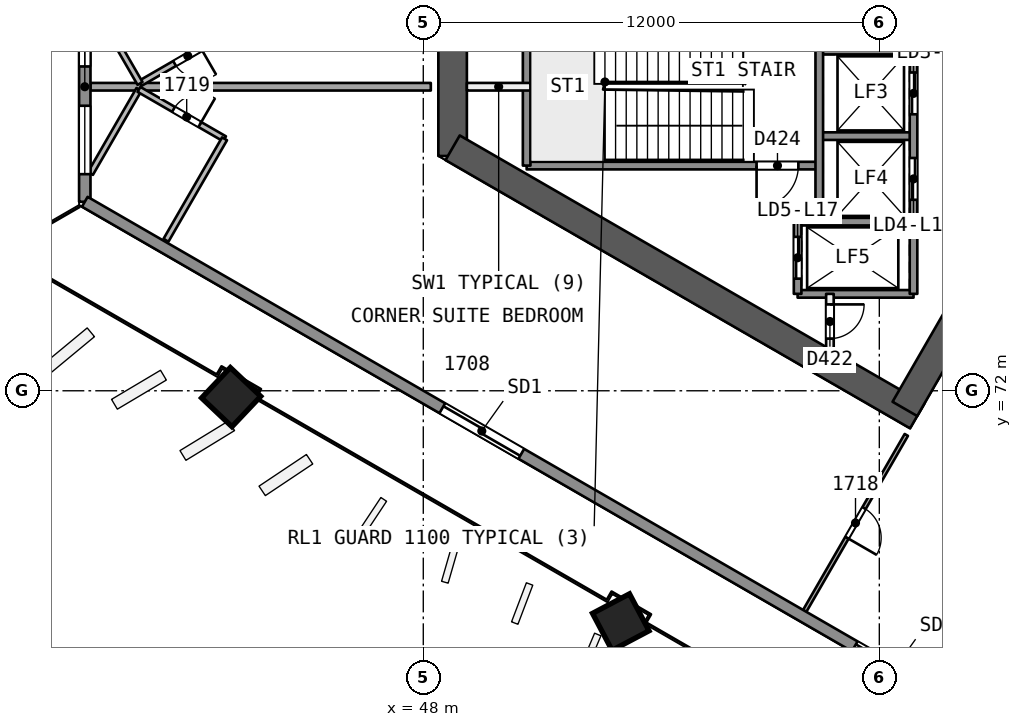
"""IFC4 building model, lengths in metres.
Left out: names, types, materials, properties, quantities, classifications, styles, units other than length and angle.
Written with IfcOpenShell. Run it as: python <this file> out.ifc"""

import sys

from ifc_helpers import new_model, si_unit, direction, frame, frame_2d, origin, origin_2d, place, context, subcontext, project, spatial, rectangle, extrude, element, fill, save


model = new_model("IFC4")
c1 = context("Model", 3, precision=1e-05, world=origin(), true_north=direction((0.0, 1.0)))
c2 = subcontext(c1, "Body", "Model", "MODEL_VIEW")
j1 = project(units=[si_unit("LENGTHUNIT", "METRE"), si_unit("PLANEANGLEUNIT", "RADIAN")], contexts=[c1])
p1 = place(None, origin())
s1 = spatial("IfcSite", under=j1, at=p1, CompositionType="ELEMENT")
p2 = place(p1, origin())
s2 = spatial("IfcBuilding", under=s1, at=p2, CompositionType="ELEMENT")
p3 = place(p2, frame((0.0, 0.0, 75.8)))
s3 = spatial("IfcBuildingStorey", under=s2, at=p3, CompositionType="ELEMENT", Elevation=75.8)
p4 = place(p3, frame((65.567, 80.0, 0.0), z_axis=(0.0, 0.0, 1.0), x_axis=(-0.499988615364, 0.866031976607, 0.0)))
e1 = element("IfcWall", 1, at=p4, inside=s3, PredefinedType="SHEAR", context=c2, shape_type="SweptSolid", body=[
    extrude(rectangle(XDim=10.163, YDim=0.75, at=frame_2d((5.082, 0.0))), origin(), (0.0, 0.0, 1.0), 3.7),
])
p5 = place(p4, frame((0.733, 0.0, 0.0)))
e2 = element("IfcOpeningElement", 2, at=p5, cuts=e1, PredefinedType="OPENING", context=c2, shape_type="SweptSolid", body=[
    extrude(rectangle(XDim=1.2, YDim=2.1, at=frame_2d((0.6, 1.05))), frame((0.0, 0.385, 0.0), z_axis=(0.0, -1.0, 0.0), x_axis=(1.0, 0.0, 0.0)), (0.0, 0.0, 1.0), 0.771),
])
p6 = place(p3, frame((48.772, 81.606, 0.0), z_axis=(0.0, 0.0, 1.0), x_axis=(0.0, -1.0, 0.0)))
e3 = element("IfcWall", 3, at=p6, inside=s3, PredefinedType="SHEAR", context=c2, shape_type="SweptSolid", body=[
    extrude(rectangle(XDim=3.429, YDim=0.75, at=frame_2d((1.714, 0.0))), origin(), (0.0, 0.0, 1.0), 3.7),
])
p7 = place(p3, frame((48.772, 78.394, 0.0), z_axis=(0.0, 0.0, 1.0), x_axis=(0.866028339916, -0.499994914436, 0.0)))
e4 = element("IfcWall", 4, at=p7, inside=s3, PredefinedType="SHEAR", context=c2, shape_type="SweptSolid", body=[
    extrude(rectangle(XDim=14.117, YDim=0.75, at=frame_2d((7.059, 0.0))), origin(), (0.0, 0.0, 1.0), 3.7),
])
p8 = place(p3, frame((60.673, 71.523, 0.0), z_axis=(0.0, 0.0, 1.0), x_axis=(0.499997052475, 0.866027105532, 0.0)))
e5 = element("IfcWall", 5, at=p8, inside=s3, PredefinedType="SHEAR", context=c2, shape_type="SweptSolid", body=[
    extrude(rectangle(XDim=10.005, YDim=0.75, at=frame_2d((5.002, 0.0))), origin(), (0.0, 0.0, 1.0), 3.7),
])
p9 = place(p8, frame((7.855, 0.0, 0.0)))
e6 = element("IfcOpeningElement", 6, at=p9, cuts=e5, PredefinedType="OPENING", context=c2, shape_type="SweptSolid", body=[
    extrude(rectangle(XDim=1.2, YDim=2.1, at=frame_2d((0.6, 1.05))), frame((0.0, 0.385, 0.0), z_axis=(0.0, -1.0, 0.0), x_axis=(1.0, 0.0, 0.0)), (0.0, 0.0, 1.0), 0.771),
])
p10 = place(p3, frame((42.91, 71.824, 0.0), z_axis=(0.02855911485, 0.006793507689, 0.999569019734), x_axis=(-0.865319840559, 0.500766443848, 0.021319996519)))
e7 = element("IfcColumn", 7, at=p10, inside=s3, PredefinedType="COLUMN", context=c2, shape_type="SweptSolid", body=[
    extrude(rectangle(XDim=1.1, YDim=1.1, at=origin_2d()), origin(), (0.0, 0.0, 1.0), 3.702),
])
p11 = place(p3, frame((53.174, 65.899, 0.0), z_axis=(0.019328516974, 0.012138044789, 0.999739504221), x_axis=(-0.865694061334, 0.500459928951, 0.010660754407)))
e8 = element("IfcColumn", 8, at=p11, inside=s3, PredefinedType="COLUMN", context=c2, shape_type="SweptSolid", body=[
    extrude(rectangle(XDim=1.1, YDim=1.1, at=origin_2d()), origin(), (0.0, 0.0, 1.0), 3.701),
])
p12 = place(p3, frame((42.798, 81.386, 0.0), z_axis=(0.0, 0.0, 1.0), x_axis=(-0.866021400173, -0.500006934395, 0.0)))
e9 = element("IfcWall", 9, at=p12, inside=s3, PredefinedType="PARTITIONING", context=c2, shape_type="SweptSolid", body=[
    extrude(rectangle(XDim=2.6, YDim=0.15, at=frame_2d((1.3, 0.0))), origin(), (0.0, 0.0, 1.0), 3.2),
])
p13 = place(p12, frame((0.75, 0.0, 0.0)))
e10 = element("IfcOpeningElement", 10, at=p13, cuts=e9, PredefinedType="OPENING", context=c2, shape_type="SweptSolid", body=[
    extrude(rectangle(XDim=0.8, YDim=2.1, at=frame_2d((0.4, 1.05))), frame((0.0, 0.085, 0.0), z_axis=(0.0, -1.0, 0.0), x_axis=(1.0, 0.0, 0.0)), (0.0, 0.0, 1.0), 0.171),
])
p14 = place(p3, frame((40.547, 80.086, 0.0), z_axis=(0.0, 0.0, 1.0), x_axis=(-0.500022016631, 0.866012692104, 0.0)))
e11 = element("IfcWall", 11, at=p14, inside=s3, PredefinedType="PARTITIONING", context=c2, shape_type="SweptSolid", body=[
    extrude(rectangle(XDim=2.61, YDim=0.15, at=frame_2d((1.305, 0.0))), origin(), (0.0, 0.0, 1.0), 3.2),
])
p15 = place(p3, frame((39.241, 80.0, 0.0), z_axis=(0.0, 0.0, 1.0), x_axis=(1.0, 0.0, 0.0)))
e12 = element("IfcWall", 12, at=p15, inside=s3, PredefinedType="PARTITIONING", context=c2, shape_type="SweptSolid", body=[
    extrude(rectangle(XDim=8.957, YDim=0.2, at=frame_2d((4.478, 0.0))), origin(), (0.0, 0.0, 1.0), 3.2),
])
p16 = place(p3, frame((60.71, 70.838, 0.0), z_axis=(0.0, 0.0, 1.0), x_axis=(-0.499974070055, -0.866040373927, 0.0)))
e13 = element("IfcWall", 13, at=p16, inside=s3, PredefinedType="PARTITIONING", context=c2, shape_type="SweptSolid", body=[
    extrude(rectangle(XDim=5.347, YDim=0.1, at=frame_2d((2.674, 0.0))), origin(), (0.0, 0.0, 1.0), 3.2),
])
p17 = place(p16, frame((2.224, 0.0, 0.0)))
e14 = element("IfcOpeningElement", 14, at=p17, cuts=e13, PredefinedType="OPENING", context=c2, shape_type="SweptSolid", body=[
    extrude(rectangle(XDim=0.9, YDim=2.1, at=frame_2d((0.45, 1.05))), frame((0.0, 0.061, 0.0), z_axis=(0.0, -1.0, 0.0), x_axis=(1.0, 0.0, 0.0)), (0.0, 0.0, 1.0), 0.121),
])
p18 = place(p3, frame((39.241, 77.718, 0.0), z_axis=(0.0, 0.0, 1.0), x_axis=(0.500014808323, 0.866016854026, 0.0)))
e15 = element("IfcWall", 15, at=p18, inside=s3, PredefinedType="PARTITIONING", context=c2, shape_type="SweptSolid", body=[
    extrude(rectangle(XDim=2.554, YDim=0.15, at=frame_2d((1.277, 0.0))), origin(), (0.0, 0.0, 1.0), 3.2),
])
p19 = place(p3, frame((40.519, 79.93, 0.0), z_axis=(0.0, 0.0, 1.0), x_axis=(0.866062058628, -0.499936506574, 0.0)))
e16 = element("IfcWall", 16, at=p19, inside=s3, PredefinedType="PARTITIONING", context=c2, shape_type="SweptSolid", body=[
    extrude(rectangle(XDim=2.6, YDim=0.15, at=frame_2d((1.3, 0.0))), origin(), (0.0, 0.0, 1.0), 3.2),
])
p20 = place(p19, frame((1.05, 0.0, 0.0)))
e17 = element("IfcOpeningElement", 17, at=p20, cuts=e16, PredefinedType="OPENING", context=c2, shape_type="SweptSolid", body=[
    extrude(rectangle(XDim=0.8, YDim=2.1, at=frame_2d((0.4, 1.05))), frame((0.0, 0.085, 0.0), z_axis=(0.0, -1.0, 0.0), x_axis=(1.0, 0.0, 0.0)), (0.0, 0.0, 1.0), 0.171),
])
p21 = place(p3, frame((42.77, 78.63, 0.0), z_axis=(0.0, 0.0, 1.0), x_axis=(-0.500021696003, -0.866012877229, 0.0)))
e18 = element("IfcWall", 18, at=p21, inside=s3, PredefinedType="PARTITIONING", context=c2, shape_type="SweptSolid", body=[
    extrude(rectangle(XDim=3.084, YDim=0.15, at=frame_2d((1.542, 0.0))), origin(), (0.0, 0.0, 1.0), 3.2),
])
p22 = place(p3, frame((39.093, 76.973, 0.0), z_axis=(0.0, 0.0, 1.0), x_axis=(0.0, 1.0, 0.0)))
e19 = element("IfcWall", 19, at=p22, inside=s3, PredefinedType="SOLIDWALL", context=c2, shape_type="SweptSolid", body=[
    extrude(rectangle(XDim=6.054, YDim=0.3, at=frame_2d((3.027, 0.0))), origin(), (0.0, 0.0, 1.0), 3.2),
])
p23 = place(p22, frame((3.56, 0.0, 0.9)))
e20 = element("IfcOpeningElement", 20, at=p23, cuts=e19, PredefinedType="OPENING", context=c2, shape_type="SweptSolid", body=[
    extrude(rectangle(XDim=1.8, YDim=1.5, at=frame_2d((0.9, 0.75))), frame((0.0, 0.161, 0.0), z_axis=(0.0, -1.0, 0.0), x_axis=(1.0, 0.0, 0.0)), (0.0, 0.0, 1.0), 0.321),
])
p24 = place(p22, frame((0.727, 0.0, 0.9)))
e21 = element("IfcOpeningElement", 21, at=p24, cuts=e19, PredefinedType="OPENING", context=c2, shape_type="SweptSolid", body=[
    extrude(rectangle(XDim=1.8, YDim=1.5, at=frame_2d((0.9, 0.75))), frame((0.0, 0.161, 0.0), z_axis=(0.0, -1.0, 0.0), x_axis=(1.0, 0.0, 0.0)), (0.0, 0.0, 1.0), 0.321),
])
p25 = place(p3, frame((90.332, 47.39, 0.0), z_axis=(0.0, 0.0, 1.0), x_axis=(-0.866024586246, 0.500001416016, 0.0)))
e22 = element("IfcWall", 22, at=p25, inside=s3, PredefinedType="SOLIDWALL", context=c2, shape_type="SweptSolid", body=[
    extrude(rectangle(XDim=59.166, YDim=0.3, at=frame_2d((29.583, 0.0))), origin(), (0.0, 0.0, 1.0), 3.2),
])
p26 = place(p25, frame((28.695, 0.0, 0.0)))
e23 = element("IfcOpeningElement", 23, at=p26, cuts=e22, PredefinedType="OPENING", context=c2, shape_type="SweptSolid", body=[
    extrude(rectangle(XDim=2.4, YDim=2.4, at=frame_2d((1.2, 1.2))), frame((0.0, 0.161, 0.0), z_axis=(0.0, -1.0, 0.0), x_axis=(1.0, 0.0, 0.0)), (0.0, 0.0, 1.0), 0.321),
])
p27 = place(p25, frame((33.372, 0.0, 0.0)))
e24 = element("IfcOpeningElement", 24, at=p27, cuts=e22, PredefinedType="OPENING", context=c2, shape_type="SweptSolid", body=[
    extrude(rectangle(XDim=2.4, YDim=2.4, at=frame_2d((1.2, 1.2))), frame((0.0, 0.161, 0.0), z_axis=(0.0, -1.0, 0.0), x_axis=(1.0, 0.0, 0.0)), (0.0, 0.0, 1.0), 0.321),
])
p28 = place(p25, frame((45.903, 0.0, 0.0)))
e25 = element("IfcOpeningElement", 25, at=p28, cuts=e22, PredefinedType="OPENING", context=c2, shape_type="SweptSolid", body=[
    extrude(rectangle(XDim=2.4, YDim=2.4, at=frame_2d((1.2, 1.2))), frame((0.0, 0.161, 0.0), z_axis=(0.0, -1.0, 0.0), x_axis=(1.0, 0.0, 0.0)), (0.0, 0.0, 1.0), 0.321),
])
p29 = place(p25, frame((12.769, 0.0, 0.0)))
e26 = element("IfcOpeningElement", 26, at=p29, cuts=e22, PredefinedType="OPENING", context=c2, shape_type="SweptSolid", body=[
    extrude(rectangle(XDim=2.4, YDim=2.4, at=frame_2d((1.2, 1.2))), frame((0.0, 0.161, 0.0), z_axis=(0.0, -1.0, 0.0), x_axis=(1.0, 0.0, 0.0)), (0.0, 0.0, 1.0), 0.321),
])
p30 = place(p3, frame((60.9, 80.95, 0.0), z_axis=(0.0, 0.0, 1.0), x_axis=(-1.0, 0.0, 0.0)))
e27 = element("IfcWall", 27, at=p30, inside=s3, PredefinedType="SOLIDWALL", context=c2, shape_type="SweptSolid", body=[
    extrude(rectangle(XDim=2.48, YDim=0.2, at=frame_2d((1.24, 0.0))), origin(), (0.0, 0.0, 1.0), 3.2),
])
p31 = place(p3, frame((50.82, 80.0, 0.0), z_axis=(0.0, 0.0, 1.0), x_axis=(-1.0, 0.0, 0.0)))
e28 = element("IfcWall", 28, at=p31, inside=s3, PredefinedType="PARTITIONING", context=c2, shape_type="SweptSolid", body=[
    extrude(rectangle(XDim=1.673, YDim=0.2, at=frame_2d((0.836, 0.0))), origin(), (0.0, 0.0, 1.0), 3.2),
])
p32 = place(p3, frame((60.9, 78.7, 0.0), z_axis=(0.0, 0.0, 1.0), x_axis=(-1.0, 0.0, 0.0)))
e29 = element("IfcWall", 29, at=p32, inside=s3, PredefinedType="SOLIDWALL", context=c2, shape_type="SweptSolid", body=[
    extrude(rectangle(XDim=2.48, YDim=0.2, at=frame_2d((1.24, 0.0))), origin(), (0.0, 0.0, 1.0), 3.2),
])
p33 = place(p3, frame((58.42, 77.925, 0.0), z_axis=(0.0, 0.0, 1.0), x_axis=(-1.0, 0.0, 0.0)))
e30 = element("IfcWall", 30, at=p33, inside=s3, PredefinedType="SOLIDWALL", context=c2, shape_type="SweptSolid", body=[
    extrude(rectangle(XDim=7.7, YDim=0.2, at=frame_2d((3.85, 0.0))), origin(), (0.0, 0.0, 1.0), 3.2),
])
p34 = place(p33, frame((0.55, 0.0, 0.0)))
e31 = element("IfcOpeningElement", 31, at=p34, cuts=e30, PredefinedType="OPENING", context=c2, shape_type="SweptSolid", body=[
    extrude(rectangle(XDim=1.1, YDim=2.1, at=frame_2d((0.55, 1.05))), frame((0.0, 0.11, 0.0), z_axis=(0.0, -1.0, 0.0), x_axis=(1.0, 0.0, 0.0)), (0.0, 0.0, 1.0), 0.221),
])
for number, where, z_axis, x_axis in (
    (32, (60.9, 76.45, 0.0), (0.0, 0.0, 1.0), (-1.0, 0.0, 0.0)),
    (33, (60.9, 74.55, 0.0), (0.0, 0.0, 1.0), (-1.0, 0.0, 0.0)),
):
    element("IfcWall", number, at=place(p3, frame(where, z_axis=z_axis, x_axis=x_axis)), inside=s3, PredefinedType="SOLIDWALL", context=c2, shape_type="SweptSolid", body=[
        extrude(rectangle(XDim=3.05, YDim=0.2, at=frame_2d((1.525, 0.0))), origin(), (0.0, 0.0, 1.0), 3.2),
    ])
p35 = place(p3, frame((60.9, 85.45, 0.0), z_axis=(0.0, 0.0, 1.0), x_axis=(0.0, -1.0, 0.0)))
e34 = element("IfcWall", 34, at=p35, inside=s3, PredefinedType="SOLIDWALL", context=c2, shape_type="SweptSolid", body=[
    extrude(rectangle(XDim=10.9, YDim=0.2, at=frame_2d((5.45, 0.0))), origin(), (0.0, 0.0, 1.0), 3.2),
])
p36 = place(p35, frame((0.575, 0.0, 0.0)))
e35 = element("IfcOpeningElement", 35, at=p36, cuts=e34, PredefinedType="OPENING", context=c2, shape_type="SweptSolid", body=[
    extrude(rectangle(XDim=1.1, YDim=2.1, at=frame_2d((0.55, 1.05))), frame((0.0, 0.11, 0.0), z_axis=(0.0, -1.0, 0.0), x_axis=(1.0, 0.0, 0.0)), (0.0, 0.0, 1.0), 0.221),
])
p37 = place(p35, frame((2.825, 0.0, 0.0)))
e36 = element("IfcOpeningElement", 36, at=p37, cuts=e34, PredefinedType="OPENING", context=c2, shape_type="SweptSolid", body=[
    extrude(rectangle(XDim=1.1, YDim=2.1, at=frame_2d((0.55, 1.05))), frame((0.0, 0.11, 0.0), z_axis=(0.0, -1.0, 0.0), x_axis=(1.0, 0.0, 0.0)), (0.0, 0.0, 1.0), 0.221),
])
p38 = place(p35, frame((5.075, 0.0, 0.0)))
e37 = element("IfcOpeningElement", 37, at=p38, cuts=e34, PredefinedType="OPENING", context=c2, shape_type="SweptSolid", body=[
    extrude(rectangle(XDim=1.1, YDim=2.1, at=frame_2d((0.55, 1.05))), frame((0.0, 0.11, 0.0), z_axis=(0.0, -1.0, 0.0), x_axis=(1.0, 0.0, 0.0)), (0.0, 0.0, 1.0), 0.221),
])
p39 = place(p35, frame((7.325, 0.0, 0.0)))
e38 = element("IfcOpeningElement", 38, at=p39, cuts=e34, PredefinedType="OPENING", context=c2, shape_type="SweptSolid", body=[
    extrude(rectangle(XDim=1.1, YDim=2.1, at=frame_2d((0.55, 1.05))), frame((0.0, 0.11, 0.0), z_axis=(0.0, -1.0, 0.0), x_axis=(1.0, 0.0, 0.0)), (0.0, 0.0, 1.0), 0.221),
])
p40 = place(p3, frame((58.7, 74.55, 0.0), z_axis=(0.0, 0.0, 1.0), x_axis=(0.0, -1.0, 0.0)))
e39 = element("IfcWall", 39, at=p40, inside=s3, PredefinedType="PARTITIONING", context=c2, shape_type="SweptSolid", body=[
    extrude(rectangle(XDim=1.455, YDim=0.2, at=frame_2d((0.728, 0.0))), origin(), (0.0, 0.0, 1.0), 3.2),
])
p41 = place(p40, frame((0.278, 0.0, 0.0)))
e40 = element("IfcOpeningElement", 40, at=p41, cuts=e39, PredefinedType="OPENING", context=c2, shape_type="SweptSolid", body=[
    extrude(rectangle(XDim=0.9, YDim=2.1, at=frame_2d((0.45, 1.05))), frame((0.0, 0.11, 0.0), z_axis=(0.0, -1.0, 0.0), x_axis=(1.0, 0.0, 0.0)), (0.0, 0.0, 1.0), 0.221),
])
p42 = place(p3, frame((58.42, 85.45, 0.0), z_axis=(0.0, 0.0, 1.0), x_axis=(0.0, -1.0, 0.0)))
e41 = element("IfcWall", 41, at=p42, inside=s3, PredefinedType="SOLIDWALL", context=c2, shape_type="SweptSolid", body=[
    extrude(rectangle(XDim=9.0, YDim=0.2, at=frame_2d((4.5, 0.0))), origin(), (0.0, 0.0, 1.0), 3.2),
])
p43 = place(p3, frame((57.85, 76.45, 0.0), z_axis=(0.0, 0.0, 1.0), x_axis=(0.0, -1.0, 0.0)))
e42 = element("IfcWall", 42, at=p43, inside=s3, PredefinedType="SOLIDWALL", context=c2, shape_type="SweptSolid", body=[
    extrude(rectangle(XDim=1.9, YDim=0.2, at=frame_2d((0.95, 0.0))), origin(), (0.0, 0.0, 1.0), 3.2),
])
p44 = place(p43, frame((0.4, 0.0, 0.0)))
e43 = element("IfcOpeningElement", 43, at=p44, cuts=e42, PredefinedType="OPENING", context=c2, shape_type="SweptSolid", body=[
    extrude(rectangle(XDim=1.1, YDim=2.1, at=frame_2d((0.55, 1.05))), frame((0.0, 0.11, 0.0), z_axis=(0.0, -1.0, 0.0), x_axis=(1.0, 0.0, 0.0)), (0.0, 0.0, 1.0), 0.221),
])
p45 = place(p3, frame((50.72, 82.075, 0.0), z_axis=(0.0, 0.0, 1.0), x_axis=(0.0, -1.0, 0.0)))
e44 = element("IfcWall", 44, at=p45, inside=s3, PredefinedType="SOLIDWALL", context=c2, shape_type="SweptSolid", body=[
    extrude(rectangle(XDim=4.15, YDim=0.2, at=frame_2d((2.075, 0.0))), origin(), (0.0, 0.0, 1.0), 3.2),
])
p46 = place(p13, origin())
e45 = element("IfcDoor", 45, at=p46, inside=s3, OperationType="SINGLE_SWING_LEFT", PredefinedType="NOTDEFINED", context=c2, shape_type="SweptSolid", body=[
    extrude(rectangle(XDim=0.8, YDim=2.1, at=frame_2d((0.4, 1.05))), frame((0.0, 0.025, 0.0), z_axis=(0.0, -1.0, 0.0), x_axis=(1.0, 0.0, 0.0)), (0.0, 0.0, 1.0), 0.05),
])
fill(e10, e45)
p47 = place(p17, origin())
e46 = element("IfcDoor", 46, at=p47, inside=s3, OperationType="SINGLE_SWING_RIGHT", PredefinedType="NOTDEFINED", context=c2, shape_type="SweptSolid", body=[
    extrude(rectangle(XDim=0.9, YDim=2.1, at=frame_2d((0.45, 1.05))), frame((0.0, 0.025, 0.0), z_axis=(0.0, -1.0, 0.0), x_axis=(1.0, 0.0, 0.0)), (0.0, 0.0, 1.0), 0.05),
])
fill(e14, e46)
p48 = place(p20, origin())
e47 = element("IfcDoor", 47, at=p48, inside=s3, OperationType="SINGLE_SWING_RIGHT", PredefinedType="NOTDEFINED", context=c2, shape_type="SweptSolid", body=[
    extrude(rectangle(XDim=0.8, YDim=2.1, at=frame_2d((0.4, 1.05))), frame((0.0, 0.025, 0.0), z_axis=(0.0, -1.0, 0.0), x_axis=(1.0, 0.0, 0.0)), (0.0, 0.0, 1.0), 0.05),
])
fill(e17, e47)
p49 = place(p23, origin())
e48 = element("IfcWindow", 48, at=p49, inside=s3, PartitioningType="SINGLE_PANEL", PredefinedType="WINDOW", context=c2, shape_type="SweptSolid", body=[
    extrude(rectangle(XDim=1.8, YDim=1.5, at=frame_2d((0.9, 0.75))), frame((0.0, 0.03, 0.0), z_axis=(0.0, -1.0, 0.0), x_axis=(1.0, 0.0, 0.0)), (0.0, 0.0, 1.0), 0.06),
])
fill(e20, e48)
p50 = place(p24, origin())
e49 = element("IfcWindow", 49, at=p50, inside=s3, PartitioningType="SINGLE_PANEL", PredefinedType="WINDOW", context=c2, shape_type="SweptSolid", body=[
    extrude(rectangle(XDim=1.8, YDim=1.5, at=frame_2d((0.9, 0.75))), frame((0.0, 0.03, 0.0), z_axis=(0.0, -1.0, 0.0), x_axis=(1.0, 0.0, 0.0)), (0.0, 0.0, 1.0), 0.06),
])
fill(e21, e49)
p51 = place(p27, origin())
e50 = element("IfcDoor", 50, at=p51, inside=s3, OperationType="SLIDING_TO_RIGHT", PredefinedType="NOTDEFINED", context=c2, shape_type="SweptSolid", body=[
    extrude(rectangle(XDim=2.4, YDim=2.4, at=frame_2d((1.2, 1.2))), frame((0.0, 0.025, 0.0), z_axis=(0.0, -1.0, 0.0), x_axis=(1.0, 0.0, 0.0)), (0.0, 0.0, 1.0), 0.05),
])
fill(e24, e50)
p52 = place(p28, origin())
e51 = element("IfcDoor", 51, at=p52, inside=s3, OperationType="SLIDING_TO_LEFT", PredefinedType="NOTDEFINED", context=c2, shape_type="SweptSolid", body=[
    extrude(rectangle(XDim=2.4, YDim=2.4, at=frame_2d((1.2, 1.2))), frame((0.0, 0.025, 0.0), z_axis=(0.0, -1.0, 0.0), x_axis=(1.0, 0.0, 0.0)), (0.0, 0.0, 1.0), 0.05),
])
fill(e25, e51)
p53 = place(p38, origin())
e52 = element("IfcDoor", 52, at=p53, inside=s3, OperationType="SLIDING_TO_RIGHT", PredefinedType="NOTDEFINED", context=c2, shape_type="SweptSolid", body=[
    extrude(rectangle(XDim=1.1, YDim=2.1, at=frame_2d((0.55, 1.05))), frame((0.0, 0.025, 0.0), z_axis=(0.0, -1.0, 0.0), x_axis=(1.0, 0.0, 0.0)), (0.0, 0.0, 1.0), 0.05),
])
fill(e37, e52)
p54 = place(p39, origin())
e53 = element("IfcDoor", 53, at=p54, inside=s3, OperationType="SLIDING_TO_LEFT", PredefinedType="NOTDEFINED", context=c2, shape_type="SweptSolid", body=[
    extrude(rectangle(XDim=1.1, YDim=2.1, at=frame_2d((0.55, 1.05))), frame((0.0, 0.025, 0.0), z_axis=(0.0, -1.0, 0.0), x_axis=(1.0, 0.0, 0.0)), (0.0, 0.0, 1.0), 0.05),
])
fill(e38, e53)
p55 = place(p44, origin())
e54 = element("IfcDoor", 54, at=p55, inside=s3, OperationType="SLIDING_TO_RIGHT", PredefinedType="NOTDEFINED", context=c2, shape_type="SweptSolid", body=[
    extrude(rectangle(XDim=1.1, YDim=2.1, at=frame_2d((0.55, 1.05))), frame((0.0, 0.025, 0.0), z_axis=(0.0, -1.0, 0.0), x_axis=(1.0, 0.0, 0.0)), (0.0, 0.0, 1.0), 0.05),
])
fill(e43, e54)
p56 = place(p41, origin())
e55 = element("IfcDoor", 55, at=p56, inside=s3, OperationType="SINGLE_SWING_LEFT", PredefinedType="NOTDEFINED", context=c2, shape_type="SweptSolid", body=[
    extrude(rectangle(XDim=0.9, YDim=2.1, at=frame_2d((0.45, 1.05))), frame((0.0, 0.025, 0.0), z_axis=(0.0, -1.0, 0.0), x_axis=(1.0, 0.0, 0.0)), (0.0, 0.0, 1.0), 0.05),
])
fill(e40, e55)
p57 = place(p34, origin())
e56 = element("IfcDoor", 56, at=p57, inside=s3, OperationType="SINGLE_SWING_RIGHT", PredefinedType="NOTDEFINED", context=c2, shape_type="SweptSolid", body=[
    extrude(rectangle(XDim=1.1, YDim=2.1, at=frame_2d((0.55, 1.05))), frame((0.0, 0.025, 0.0), z_axis=(0.0, -1.0, 0.0), x_axis=(1.0, 0.0, 0.0)), (0.0, 0.0, 1.0), 0.05),
])
fill(e31, e56)
save(model, sys.argv[1])
